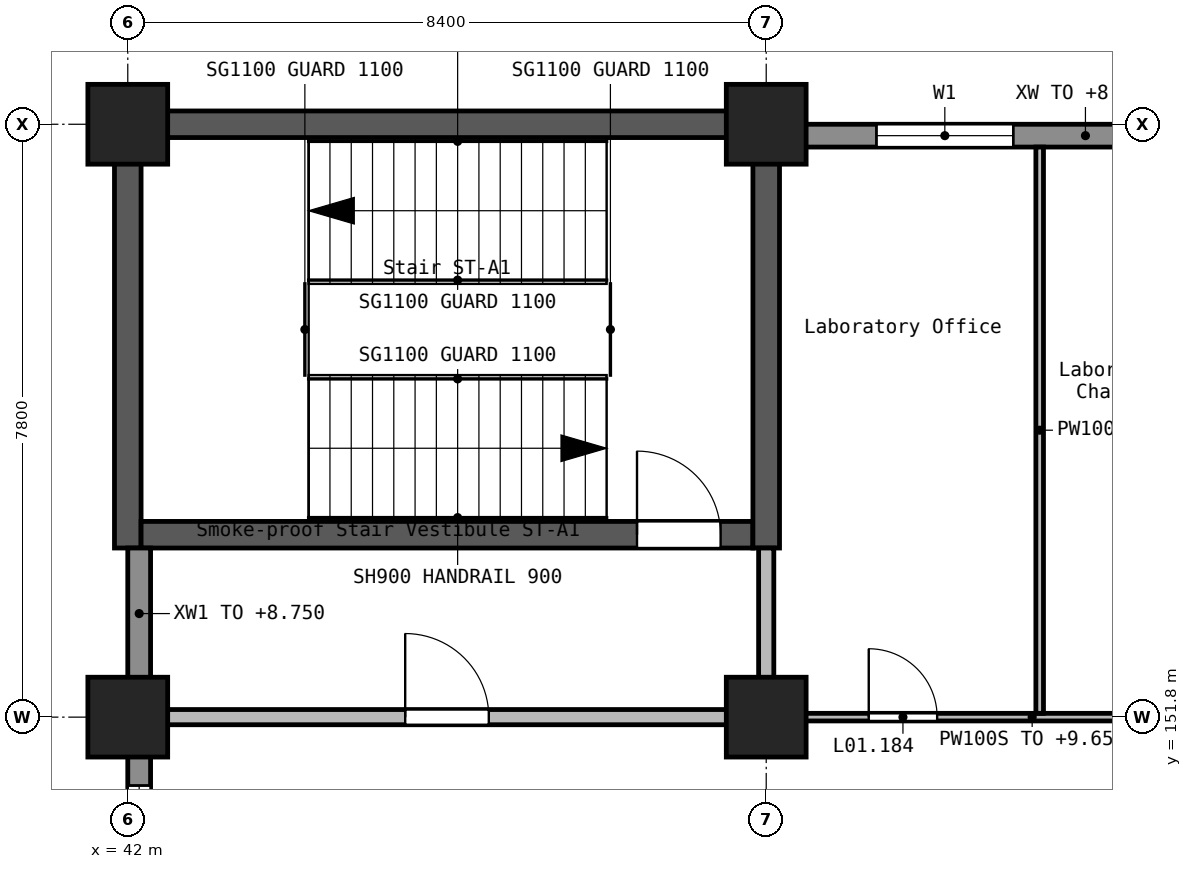
"""IFC4 building model, lengths in metres.
Left out: names, types, materials, properties, quantities, classifications, styles, units other than length and angle.
Written with IfcOpenShell. Run it as: python <this file> out.ifc"""

import sys

from ifc_helpers import new_model, si_unit, direction, frame, frame_2d, origin, origin_2d, place, context, subcontext, project, spatial, rectangle, extrude, element, fill, save


model = new_model("IFC4")
c1 = context("Model", 3, precision=1e-05, world=origin(), true_north=direction((0.0, 1.0)))
c2 = subcontext(c1, "Body", "Model", "MODEL_VIEW")
j1 = project(units=[si_unit("LENGTHUNIT", "METRE"), si_unit("PLANEANGLEUNIT", "RADIAN")], contexts=[c1])
p1 = place(None, origin())
s1 = spatial("IfcSite", under=j1, at=p1, CompositionType="ELEMENT")
p2 = place(p1, origin())
s2 = spatial("IfcBuilding", under=s1, at=p2, CompositionType="ELEMENT")
p3 = place(p2, frame((0.0, 0.0, 5.4)))
s3 = spatial("IfcBuildingStorey", under=s2, at=p3, CompositionType="ELEMENT", Elevation=5.4)
for number, where, z_axis, x_axis in (
    (1, (42.0, 151.8, 0.0), (0.0, 0.0, 1.0), (1.0, 0.0, 0.0)),
    (2, (42.0, 159.6, 0.0), (0.0, 0.0, 1.0), (1.0, 0.0, 0.0)),
    (3, (50.4, 151.8, 0.0), (0.0, 0.0, 1.0), (1.0, 0.0, 0.0)),
    (4, (50.4, 159.6, 0.0), (0.0, 0.0, 1.0), (1.0, 0.0, 0.0)),
):
    element("IfcColumn", number, at=place(p3, frame(where, z_axis=z_axis, x_axis=x_axis)), inside=s3, PredefinedType="COLUMN", context=c2, shape_type="SweptSolid", body=[
        extrude(rectangle(XDim=1.05, YDim=1.05, at=origin_2d()), origin(), (0.0, 0.0, 1.0), 4.5),
    ])
p4 = place(p3, frame((41.825, 159.6, 0.0), z_axis=(0.0, 0.0, 1.0), x_axis=(1.0, 0.0, 0.0)))
e5 = element("IfcWall", 5, at=p4, inside=s3, PredefinedType="SHEAR", context=c2, shape_type="SweptSolid", body=[
    extrude(rectangle(XDim=8.4, YDim=0.35, at=frame_2d((4.2, 0.0))), origin(), (0.0, 0.0, 1.0), 4.5),
])
p5 = place(p3, frame((42.0, 154.025, 0.0), z_axis=(0.0, 0.0, 1.0), x_axis=(0.0, 1.0, 0.0)))
e6 = element("IfcWall", 6, at=p5, inside=s3, PredefinedType="SHEAR", context=c2, shape_type="SweptSolid", body=[
    extrude(rectangle(XDim=5.4, YDim=0.35, at=frame_2d((2.7, 0.0))), origin(), (0.0, 0.0, 1.0), 4.5),
])
p6 = place(p3, frame((42.175, 154.2, 0.0), z_axis=(0.0, 0.0, 1.0), x_axis=(1.0, 0.0, 0.0)))
e7 = element("IfcWall", 7, at=p6, inside=s3, PredefinedType="SHEAR", context=c2, shape_type="SweptSolid", body=[
    extrude(rectangle(XDim=8.05, YDim=0.35, at=frame_2d((4.025, 0.0))), origin(), (0.0, 0.0, 1.0), 4.5),
])
p7 = place(p6, frame((6.525, 0.0, 0.0)))
e8 = element("IfcOpeningElement", 8, at=p7, cuts=e7, PredefinedType="OPENING", context=c2, shape_type="SweptSolid", body=[
    extrude(rectangle(XDim=1.1, YDim=2.1, at=frame_2d((0.55, 1.05))), frame((0.0, 0.185, 0.0), z_axis=(0.0, -1.0, 0.0), x_axis=(1.0, 0.0, 0.0)), (0.0, 0.0, 1.0), 0.37),
])
p8 = place(p3, frame((50.4, 154.025, 0.0), z_axis=(0.0, 0.0, 1.0), x_axis=(0.0, 1.0, 0.0)))
e9 = element("IfcWall", 9, at=p8, inside=s3, PredefinedType="SHEAR", context=c2, shape_type="SweptSolid", body=[
    extrude(rectangle(XDim=5.75, YDim=0.35, at=frame_2d((2.875, 0.0))), origin(), (0.0, 0.0, 1.0), 4.5),
])
p9 = place(p3, frame((58.3, 159.45, 0.0), z_axis=(0.0, 0.0, 1.0), x_axis=(-1.0, 0.0, 0.0)))
e10 = element("IfcWall", 10, at=p9, inside=s3, PredefinedType="STANDARD", context=c2, shape_type="SweptSolid", body=[
    extrude(rectangle(XDim=7.4, YDim=0.3, at=frame_2d((3.7, 0.0))), origin(), (0.0, 0.0, 1.0), 3.35),
])
p10 = place(p9, frame((1.5, 0.0, 0.9)))
e11 = element("IfcOpeningElement", 11, at=p10, cuts=e10, PredefinedType="OPENING", context=c2, shape_type="SweptSolid", body=[
    extrude(rectangle(XDim=1.8, YDim=1.5, at=frame_2d((0.9, 0.75))), frame((0.0, 0.16, 0.0), z_axis=(0.0, -1.0, 0.0), x_axis=(1.0, 0.0, 0.0)), (0.0, 0.0, 1.0), 0.32),
])
p11 = place(p9, frame((4.65, 0.0, 0.9)))
e12 = element("IfcOpeningElement", 12, at=p11, cuts=e10, PredefinedType="OPENING", context=c2, shape_type="SweptSolid", body=[
    extrude(rectangle(XDim=1.8, YDim=1.5, at=frame_2d((0.9, 0.75))), frame((0.0, 0.16, 0.0), z_axis=(0.0, -1.0, 0.0), x_axis=(1.0, 0.0, 0.0)), (0.0, 0.0, 1.0), 0.32),
])
p12 = place(p3, frame((42.15, 154.025, 0.0), z_axis=(0.0, 0.0, 1.0), x_axis=(0.0, -1.0, 0.0)))
e13 = element("IfcWall", 13, at=p12, inside=s3, PredefinedType="STANDARD", context=c2, shape_type="SweptSolid", body=[
    extrude(rectangle(XDim=1.725, YDim=0.3, at=frame_2d((0.862, 0.0))), origin(), (0.0, 0.0, 1.0), 3.35),
])
p13 = place(p3, frame((42.15, 151.3, 0.0), z_axis=(0.0, 0.0, 1.0), x_axis=(0.0, -1.0, 0.0)))
e14 = element("IfcWall", 14, at=p13, inside=s3, PredefinedType="STANDARD", context=c2, shape_type="SweptSolid", body=[
    extrude(rectangle(XDim=2.6, YDim=0.3, at=frame_2d((1.3, 0.0))), origin(), (0.0, 0.0, 1.0), 3.35),
])
p14 = place(p13, frame((0.4, 0.0, 0.9)))
e15 = element("IfcOpeningElement", 15, at=p14, cuts=e14, PredefinedType="OPENING", context=c2, shape_type="SweptSolid", body=[
    extrude(rectangle(XDim=1.8, YDim=1.5, at=frame_2d((0.9, 0.75))), frame((0.0, 0.16, 0.0), z_axis=(0.0, -1.0, 0.0), x_axis=(1.0, 0.0, 0.0)), (0.0, 0.0, 1.0), 0.32),
])
p15 = place(p3, frame((42.5, 151.8, 0.0), z_axis=(0.0, 0.0, 1.0), x_axis=(1.0, 0.0, 0.0)))
e16 = element("IfcWall", 16, at=p15, inside=s3, PredefinedType="SOLIDWALL", context=c2, shape_type="SweptSolid", body=[
    extrude(rectangle(XDim=7.4, YDim=0.2, at=frame_2d((3.7, 0.0))), origin(), (0.0, 0.0, 1.0), 4.25),
])
p16 = place(p15, frame((3.15, 0.0, 0.0)))
e17 = element("IfcOpeningElement", 17, at=p16, cuts=e16, PredefinedType="OPENING", context=c2, shape_type="SweptSolid", body=[
    extrude(rectangle(XDim=1.1, YDim=2.1, at=frame_2d((0.55, 1.05))), frame((0.0, 0.11, 0.0), z_axis=(0.0, -1.0, 0.0), x_axis=(1.0, 0.0, 0.0)), (0.0, 0.0, 1.0), 0.22),
])
p17 = place(p3, frame((50.4, 152.3, 0.0), z_axis=(0.0, 0.0, 1.0), x_axis=(0.0, 1.0, 0.0)))
e18 = element("IfcWall", 18, at=p17, inside=s3, PredefinedType="SOLIDWALL", context=c2, shape_type="SweptSolid", body=[
    extrude(rectangle(XDim=1.725, YDim=0.2, at=frame_2d((0.862, 0.0))), origin(), (0.0, 0.0, 1.0), 4.25),
])
p18 = place(p3, frame((50.9, 151.8, 0.0), z_axis=(0.0, 0.0, 1.0), x_axis=(1.0, 0.0, 0.0)))
e19 = element("IfcWall", 19, at=p18, inside=s3, PredefinedType="PARTITIONING", context=c2, shape_type="SweptSolid", body=[
    extrude(rectangle(XDim=5.998, YDim=0.1, at=frame_2d((2.999, 0.0))), origin(), (0.0, 0.0, 1.0), 4.25),
])
p19 = place(p18, frame((0.849, 0.0, 0.0)))
e20 = element("IfcOpeningElement", 20, at=p19, cuts=e19, PredefinedType="OPENING", context=c2, shape_type="SweptSolid", body=[
    extrude(rectangle(XDim=0.9, YDim=2.1, at=frame_2d((0.45, 1.05))), frame((0.0, 0.06, 0.0), z_axis=(0.0, -1.0, 0.0), x_axis=(1.0, 0.0, 0.0)), (0.0, 0.0, 1.0), 0.12),
])
p20 = place(p18, frame((4.148, 0.0, 0.0)))
e21 = element("IfcOpeningElement", 21, at=p20, cuts=e19, PredefinedType="OPENING", context=c2, shape_type="SweptSolid", body=[
    extrude(rectangle(XDim=0.9, YDim=2.1, at=frame_2d((0.45, 1.05))), frame((0.0, 0.06, 0.0), z_axis=(0.0, -1.0, 0.0), x_axis=(1.0, 0.0, 0.0)), (0.0, 0.0, 1.0), 0.12),
])
p21 = place(p3, frame((53.998, 151.85, 0.0), z_axis=(0.0, 0.0, 1.0), x_axis=(0.0, 1.0, 0.0)))
e22 = element("IfcWall", 22, at=p21, inside=s3, PredefinedType="PARTITIONING", context=c2, shape_type="SweptSolid", body=[
    extrude(rectangle(XDim=7.45, YDim=0.1, at=frame_2d((3.725, 0.0))), origin(), (0.0, 0.0, 1.0), 4.25),
])
p22 = place(p11, origin())
e23 = element("IfcWindow", 23, at=p22, inside=s3, PartitioningType="SINGLE_PANEL", PredefinedType="WINDOW", context=c2, shape_type="SweptSolid", body=[
    extrude(rectangle(XDim=1.8, YDim=1.5, at=frame_2d((0.9, 0.75))), frame((0.0, 0.03, 0.0), z_axis=(0.0, -1.0, 0.0), x_axis=(1.0, 0.0, 0.0)), (0.0, 0.0, 1.0), 0.06),
])
fill(e12, e23)
p23 = place(p14, origin())
e24 = element("IfcWindow", 24, at=p23, inside=s3, PartitioningType="SINGLE_PANEL", PredefinedType="WINDOW", context=c2, shape_type="SweptSolid", body=[
    extrude(rectangle(XDim=1.8, YDim=1.5, at=frame_2d((0.9, 0.75))), frame((0.0, 0.03, 0.0), z_axis=(0.0, -1.0, 0.0), x_axis=(1.0, 0.0, 0.0)), (0.0, 0.0, 1.0), 0.06),
])
fill(e15, e24)
p24 = place(p7, origin())
e25 = element("IfcDoor", 25, at=p24, inside=s3, OperationType="SINGLE_SWING_RIGHT", PredefinedType="DOOR", context=c2, shape_type="SweptSolid", body=[
    extrude(rectangle(XDim=1.1, YDim=2.1, at=frame_2d((0.55, 1.05))), frame((0.0, 0.025, 0.0), z_axis=(0.0, -1.0, 0.0), x_axis=(1.0, 0.0, 0.0)), (0.0, 0.0, 1.0), 0.05),
])
fill(e8, e25)
p25 = place(p16, origin())
e26 = element("IfcDoor", 26, at=p25, inside=s3, OperationType="SINGLE_SWING_RIGHT", PredefinedType="DOOR", context=c2, shape_type="SweptSolid", body=[
    extrude(rectangle(XDim=1.1, YDim=2.1, at=frame_2d((0.55, 1.05))), frame((0.0, 0.025, 0.0), z_axis=(0.0, -1.0, 0.0), x_axis=(1.0, 0.0, 0.0)), (0.0, 0.0, 1.0), 0.05),
])
fill(e17, e26)
p26 = place(p19, origin())
e27 = element("IfcDoor", 27, at=p26, inside=s3, OperationType="SINGLE_SWING_LEFT", PredefinedType="DOOR", context=c2, shape_type="SweptSolid", body=[
    extrude(rectangle(XDim=0.9, YDim=2.1, at=frame_2d((0.45, 1.05))), frame((0.0, 0.025, 0.0), z_axis=(0.0, -1.0, 0.0), x_axis=(1.0, 0.0, 0.0)), (0.0, 0.0, 1.0), 0.05),
])
fill(e20, e27)
save(model, sys.argv[1])
